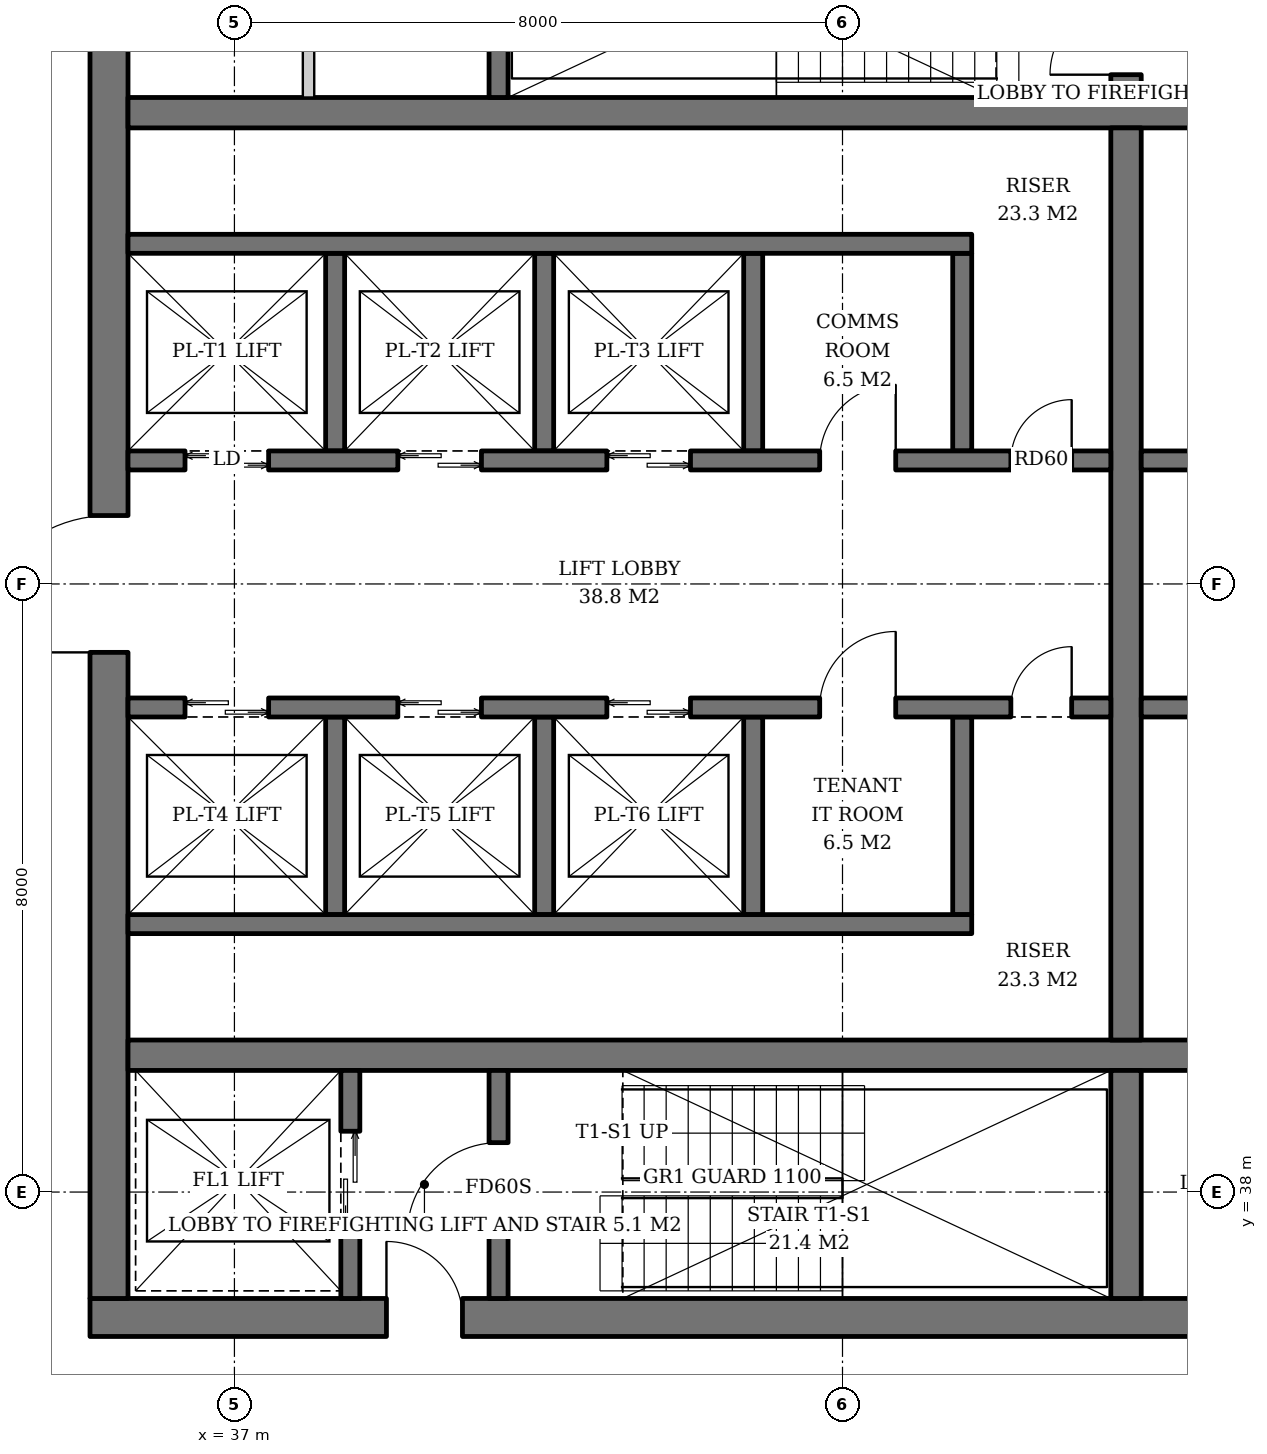
"""IFC4 building model, lengths in metres.
Left out: names, types, materials, properties, quantities, classifications, styles, units other than length and angle.
Written with IfcOpenShell. Run it as: python <this file> out.ifc"""

import sys

from ifc_helpers import new_model, si_unit, direction, frame, frame_2d, origin, place, context, subcontext, project, spatial, rectangle, extrude, element, fill, save


model = new_model("IFC4")
c1 = context("Model", 3, precision=1e-05, world=origin(), true_north=direction((0.0, 1.0)))
c2 = subcontext(c1, "Body", "Model", "MODEL_VIEW")
j1 = project(units=[si_unit("LENGTHUNIT", "METRE"), si_unit("PLANEANGLEUNIT", "RADIAN")], contexts=[c1])
p1 = place(None, origin())
s1 = spatial("IfcSite", under=j1, at=p1, CompositionType="ELEMENT")
p2 = place(p1, origin())
s2 = spatial("IfcBuilding", under=s1, at=p2, CompositionType="ELEMENT")
p3 = place(p2, frame((0.0, 0.0, 275.6)))
s3 = spatial("IfcBuildingStorey", under=s2, at=p3, CompositionType="ELEMENT", Elevation=275.6)
p4 = place(p3, frame((35.1, 36.35, 0.0), z_axis=(0.0, 0.0, 1.0), x_axis=(1.0, 0.0, 0.0)))
e1 = element("IfcWall", 1, at=p4, inside=s3, PredefinedType="SHEAR", context=c2, shape_type="SweptSolid", body=[
    extrude(rectangle(XDim=19.8, YDim=0.5, at=frame_2d((9.9, 0.0))), origin(), (0.0, 0.0, 1.0), 3.8),
])
p5 = place(p4, frame((3.9, 0.0, 0.0)))
e2 = element("IfcOpeningElement", 2, at=p5, cuts=e1, PredefinedType="OPENING", context=c2, shape_type="SweptSolid", body=[
    extrude(rectangle(XDim=1.0, YDim=2.1, at=frame_2d((0.5, 1.05))), frame((0.0, 0.26, 0.0), z_axis=(0.0, -1.0, 0.0), x_axis=(1.0, 0.0, 0.0)), (0.0, 0.0, 1.0), 0.52),
])
p6 = place(p4, frame((15.35, 0.0, 0.0)))
e3 = element("IfcOpeningElement", 3, at=p6, cuts=e1, PredefinedType="OPENING", context=c2, shape_type="SweptSolid", body=[
    extrude(rectangle(XDim=1.0, YDim=2.1, at=frame_2d((0.5, 1.05))), frame((0.0, 0.26, 0.0), z_axis=(0.0, -1.0, 0.0), x_axis=(1.0, 0.0, 0.0)), (0.0, 0.0, 1.0), 0.52),
])
p7 = place(p3, frame((35.35, 36.6, 0.0), z_axis=(0.0, 0.0, 1.0), x_axis=(0.0, 1.0, 0.0)))
e4 = element("IfcWall", 4, at=p7, inside=s3, PredefinedType="SHEAR", context=c2, shape_type="SweptSolid", body=[
    extrude(rectangle(XDim=18.8, YDim=0.5, at=frame_2d((9.4, 0.0))), origin(), (0.0, 0.0, 1.0), 3.8),
])
p8 = place(p7, frame((8.5, 0.0, 0.0)))
e5 = element("IfcOpeningElement", 5, at=p8, cuts=e4, PredefinedType="OPENING", context=c2, shape_type="SweptSolid", body=[
    extrude(rectangle(XDim=1.8, YDim=2.4, at=frame_2d((0.9, 1.2))), frame((0.0, 0.26, 0.0), z_axis=(0.0, -1.0, 0.0), x_axis=(1.0, 0.0, 0.0)), (0.0, 0.0, 1.0), 0.52),
])
for number, where, z_axis, x_axis in (
    (6, (35.6, 39.8, 0.0), (0.0, 0.0, 1.0), (1.0, 0.0, 0.0)),
    (7, (35.6, 52.2, 0.0), (0.0, 0.0, 1.0), (1.0, 0.0, 0.0)),
):
    element("IfcWall", number, at=place(p3, frame(where, z_axis=z_axis, x_axis=x_axis)), inside=s3, PredefinedType="SHEAR", context=c2, shape_type="SweptSolid", body=[
        extrude(rectangle(XDim=18.8, YDim=0.4, at=frame_2d((9.4, 0.0))), origin(), (0.0, 0.0, 1.0), 3.8),
    ])
p9 = place(p3, frame((48.73, 36.6, 0.0), z_axis=(0.0, 0.0, 1.0), x_axis=(0.0, 1.0, 0.0)))
e8 = element("IfcWall", 8, at=p9, inside=s3, PredefinedType="SHEAR", context=c2, shape_type="SweptSolid", body=[
    extrude(rectangle(XDim=3.0, YDim=0.4, at=frame_2d((1.5, 0.0))), origin(), (0.0, 0.0, 1.0), 3.8),
])
p10 = place(p3, frame((48.73, 40.0, 0.0), z_axis=(0.0, 0.0, 1.0), x_axis=(0.0, 1.0, 0.0)))
e9 = element("IfcWall", 9, at=p10, inside=s3, PredefinedType="SHEAR", context=c2, shape_type="SweptSolid", body=[
    extrude(rectangle(XDim=12.0, YDim=0.4, at=frame_2d((6.0, 0.0))), origin(), (0.0, 0.0, 1.0), 3.8),
])
p11 = place(p3, frame((48.73, 52.4, 0.0), z_axis=(0.0, 0.0, 1.0), x_axis=(0.0, 1.0, 0.0)))
e10 = element("IfcWall", 10, at=p11, inside=s3, PredefinedType="SHEAR", context=c2, shape_type="SweptSolid", body=[
    extrude(rectangle(XDim=3.0, YDim=0.4, at=frame_2d((1.5, 0.0))), origin(), (0.0, 0.0, 1.0), 3.8),
])
p12 = place(p11, frame((0.3, 0.0, 0.0)))
e11 = element("IfcOpeningElement", 11, at=p12, cuts=e10, PredefinedType="OPENING", context=c2, shape_type="SweptSolid", body=[
    extrude(rectangle(XDim=1.0, YDim=2.1, at=frame_2d((0.5, 1.05))), frame((0.0, 0.21, 0.0), z_axis=(0.0, -1.0, 0.0), x_axis=(1.0, 0.0, 0.0)), (0.0, 0.0, 1.0), 0.42),
])
p13 = place(p3, frame((38.525, 36.6, 0.0), z_axis=(0.0, 0.0, 1.0), x_axis=(0.0, 1.0, 0.0)))
e12 = element("IfcWall", 12, at=p13, inside=s3, PredefinedType="SHEAR", context=c2, shape_type="SweptSolid", body=[
    extrude(rectangle(XDim=3.0, YDim=0.25, at=frame_2d((1.5, 0.0))), origin(), (0.0, 0.0, 1.0), 3.8),
])
p14 = place(p13, frame((0.9, 0.0, 0.0)))
e13 = element("IfcOpeningElement", 13, at=p14, cuts=e12, PredefinedType="OPENING", context=c2, shape_type="SweptSolid", body=[
    extrude(rectangle(XDim=1.3, YDim=2.2, at=frame_2d((0.65, 1.1))), frame((0.0, 0.135, 0.0), z_axis=(0.0, -1.0, 0.0), x_axis=(1.0, 0.0, 0.0)), (0.0, 0.0, 1.0), 0.27),
])
p15 = place(p3, frame((40.475, 36.6, 0.0), z_axis=(0.0, 0.0, 1.0), x_axis=(0.0, 1.0, 0.0)))
e14 = element("IfcWall", 14, at=p15, inside=s3, PredefinedType="SHEAR", context=c2, shape_type="SweptSolid", body=[
    extrude(rectangle(XDim=3.0, YDim=0.25, at=frame_2d((1.5, 0.0))), origin(), (0.0, 0.0, 1.0), 3.8),
])
p16 = place(p15, frame((0.85, 0.0, 0.0)))
e15 = element("IfcOpeningElement", 15, at=p16, cuts=e14, PredefinedType="OPENING", context=c2, shape_type="SweptSolid", body=[
    extrude(rectangle(XDim=1.2, YDim=2.1, at=frame_2d((0.6, 1.05))), frame((0.0, 0.135, 0.0), z_axis=(0.0, -1.0, 0.0), x_axis=(1.0, 0.0, 0.0)), (0.0, 0.0, 1.0), 0.27),
])
p17 = place(p3, frame((40.475, 52.4, 0.0), z_axis=(0.0, 0.0, 1.0), x_axis=(0.0, 1.0, 0.0)))
e16 = element("IfcWall", 16, at=p17, inside=s3, PredefinedType="SHEAR", context=c2, shape_type="SweptSolid", body=[
    extrude(rectangle(XDim=3.0, YDim=0.25, at=frame_2d((1.5, 0.0))), origin(), (0.0, 0.0, 1.0), 3.8),
])
for number, where, z_axis, x_axis in (
    (17, (38.325, 47.75, 0.0), (0.0, 0.0, 1.0), (0.0, 1.0, 0.0)),
    (18, (41.075, 47.75, 0.0), (0.0, 0.0, 1.0), (0.0, 1.0, 0.0)),
    (19, (43.825, 47.75, 0.0), (0.0, 0.0, 1.0), (0.0, 1.0, 0.0)),
    (20, (46.575, 47.75, 0.0), (0.0, 0.0, 1.0), (0.0, 1.0, 0.0)),
):
    element("IfcWall", number, at=place(p3, frame(where, z_axis=z_axis, x_axis=x_axis)), inside=s3, PredefinedType="SHEAR", context=c2, shape_type="SweptSolid", body=[
        extrude(rectangle(XDim=2.6, YDim=0.25, at=frame_2d((1.3, 0.0))), origin(), (0.0, 0.0, 1.0), 3.8),
    ])
p18 = place(p3, frame((35.6, 50.475, 0.0), z_axis=(0.0, 0.0, 1.0), x_axis=(1.0, 0.0, 0.0)))
e21 = element("IfcWall", 21, at=p18, inside=s3, PredefinedType="SHEAR", context=c2, shape_type="SweptSolid", body=[
    extrude(rectangle(XDim=11.1, YDim=0.25, at=frame_2d((5.55, 0.0))), origin(), (0.0, 0.0, 1.0), 3.8),
])
p19 = place(p3, frame((35.6, 47.625, 0.0), z_axis=(0.0, 0.0, 1.0), x_axis=(1.0, 0.0, 0.0)))
e22 = element("IfcWall", 22, at=p19, inside=s3, PredefinedType="SHEAR", context=c2, shape_type="SweptSolid", body=[
    extrude(rectangle(XDim=12.93, YDim=0.25, at=frame_2d((6.465, 0.0))), origin(), (0.0, 0.0, 1.0), 3.8),
])
p20 = place(p19, frame((0.75, 0.0, 0.0)))
e23 = element("IfcOpeningElement", 23, at=p20, cuts=e22, PredefinedType="OPENING", context=c2, shape_type="SweptSolid", body=[
    extrude(rectangle(XDim=1.1, YDim=2.2, at=frame_2d((0.55, 1.1))), frame((0.0, 0.135, 0.0), z_axis=(0.0, -1.0, 0.0), x_axis=(1.0, 0.0, 0.0)), (0.0, 0.0, 1.0), 0.27),
])
p21 = place(p19, frame((3.55, 0.0, 0.0)))
e24 = element("IfcOpeningElement", 24, at=p21, cuts=e22, PredefinedType="OPENING", context=c2, shape_type="SweptSolid", body=[
    extrude(rectangle(XDim=1.1, YDim=2.2, at=frame_2d((0.55, 1.1))), frame((0.0, 0.135, 0.0), z_axis=(0.0, -1.0, 0.0), x_axis=(1.0, 0.0, 0.0)), (0.0, 0.0, 1.0), 0.27),
])
p22 = place(p19, frame((6.3, 0.0, 0.0)))
e25 = element("IfcOpeningElement", 25, at=p22, cuts=e22, PredefinedType="OPENING", context=c2, shape_type="SweptSolid", body=[
    extrude(rectangle(XDim=1.1, YDim=2.2, at=frame_2d((0.55, 1.1))), frame((0.0, 0.135, 0.0), z_axis=(0.0, -1.0, 0.0), x_axis=(1.0, 0.0, 0.0)), (0.0, 0.0, 1.0), 0.27),
])
p23 = place(p19, frame((9.1, 0.0, 0.0)))
e26 = element("IfcOpeningElement", 26, at=p23, cuts=e22, PredefinedType="OPENING", context=c2, shape_type="SweptSolid", body=[
    extrude(rectangle(XDim=1.0, YDim=2.1, at=frame_2d((0.5, 1.05))), frame((0.0, 0.135, 0.0), z_axis=(0.0, -1.0, 0.0), x_axis=(1.0, 0.0, 0.0)), (0.0, 0.0, 1.0), 0.27),
])
p24 = place(p19, frame((11.615, 0.0, 0.0)))
e27 = element("IfcOpeningElement", 27, at=p24, cuts=e22, PredefinedType="OPENING", context=c2, shape_type="SweptSolid", body=[
    extrude(rectangle(XDim=0.8, YDim=2.0, at=frame_2d((0.4, 1.0))), frame((0.0, 0.135, 0.0), z_axis=(0.0, -1.0, 0.0), x_axis=(1.0, 0.0, 0.0)), (0.0, 0.0, 1.0), 0.27),
])
for number, where, z_axis, x_axis in (
    (28, (38.325, 44.25, 0.0), (0.0, 0.0, 1.0), (0.0, -1.0, 0.0)),
    (29, (41.075, 44.25, 0.0), (0.0, 0.0, 1.0), (0.0, -1.0, 0.0)),
    (30, (43.825, 44.25, 0.0), (0.0, 0.0, 1.0), (0.0, -1.0, 0.0)),
    (31, (46.575, 44.25, 0.0), (0.0, 0.0, 1.0), (0.0, -1.0, 0.0)),
):
    element("IfcWall", number, at=place(p3, frame(where, z_axis=z_axis, x_axis=x_axis)), inside=s3, PredefinedType="SHEAR", context=c2, shape_type="SweptSolid", body=[
        extrude(rectangle(XDim=2.6, YDim=0.25, at=frame_2d((1.3, 0.0))), origin(), (0.0, 0.0, 1.0), 3.8),
    ])
p25 = place(p3, frame((35.6, 41.525, 0.0), z_axis=(0.0, 0.0, 1.0), x_axis=(1.0, 0.0, 0.0)))
e32 = element("IfcWall", 32, at=p25, inside=s3, PredefinedType="SHEAR", context=c2, shape_type="SweptSolid", body=[
    extrude(rectangle(XDim=11.1, YDim=0.25, at=frame_2d((5.55, 0.0))), origin(), (0.0, 0.0, 1.0), 3.8),
])
p26 = place(p3, frame((35.6, 44.375, 0.0), z_axis=(0.0, 0.0, 1.0), x_axis=(1.0, 0.0, 0.0)))
e33 = element("IfcWall", 33, at=p26, inside=s3, PredefinedType="SHEAR", context=c2, shape_type="SweptSolid", body=[
    extrude(rectangle(XDim=12.93, YDim=0.25, at=frame_2d((6.465, 0.0))), origin(), (0.0, 0.0, 1.0), 3.8),
])
p27 = place(p26, frame((0.75, 0.0, 0.0)))
e34 = element("IfcOpeningElement", 34, at=p27, cuts=e33, PredefinedType="OPENING", context=c2, shape_type="SweptSolid", body=[
    extrude(rectangle(XDim=1.1, YDim=2.2, at=frame_2d((0.55, 1.1))), frame((0.0, 0.135, 0.0), z_axis=(0.0, -1.0, 0.0), x_axis=(1.0, 0.0, 0.0)), (0.0, 0.0, 1.0), 0.27),
])
p28 = place(p26, frame((3.55, 0.0, 0.0)))
e35 = element("IfcOpeningElement", 35, at=p28, cuts=e33, PredefinedType="OPENING", context=c2, shape_type="SweptSolid", body=[
    extrude(rectangle(XDim=1.1, YDim=2.2, at=frame_2d((0.55, 1.1))), frame((0.0, 0.135, 0.0), z_axis=(0.0, -1.0, 0.0), x_axis=(1.0, 0.0, 0.0)), (0.0, 0.0, 1.0), 0.27),
])
p29 = place(p26, frame((6.3, 0.0, 0.0)))
e36 = element("IfcOpeningElement", 36, at=p29, cuts=e33, PredefinedType="OPENING", context=c2, shape_type="SweptSolid", body=[
    extrude(rectangle(XDim=1.1, YDim=2.2, at=frame_2d((0.55, 1.1))), frame((0.0, 0.135, 0.0), z_axis=(0.0, -1.0, 0.0), x_axis=(1.0, 0.0, 0.0)), (0.0, 0.0, 1.0), 0.27),
])
p30 = place(p26, frame((9.1, 0.0, 0.0)))
e37 = element("IfcOpeningElement", 37, at=p30, cuts=e33, PredefinedType="OPENING", context=c2, shape_type="SweptSolid", body=[
    extrude(rectangle(XDim=1.0, YDim=2.1, at=frame_2d((0.5, 1.05))), frame((0.0, 0.135, 0.0), z_axis=(0.0, -1.0, 0.0), x_axis=(1.0, 0.0, 0.0)), (0.0, 0.0, 1.0), 0.27),
])
p31 = place(p26, frame((11.615, 0.0, 0.0)))
e38 = element("IfcOpeningElement", 38, at=p31, cuts=e33, PredefinedType="OPENING", context=c2, shape_type="SweptSolid", body=[
    extrude(rectangle(XDim=0.8, YDim=2.0, at=frame_2d((0.4, 1.0))), frame((0.0, 0.135, 0.0), z_axis=(0.0, -1.0, 0.0), x_axis=(1.0, 0.0, 0.0)), (0.0, 0.0, 1.0), 0.27),
])
p32 = place(p3, frame((48.93, 47.625, 0.0), z_axis=(0.0, 0.0, 1.0), x_axis=(1.0, 0.0, 0.0)))
e39 = element("IfcWall", 39, at=p32, inside=s3, PredefinedType="SHEAR", context=c2, shape_type="SweptSolid", body=[
    extrude(rectangle(XDim=5.47, YDim=0.25, at=frame_2d((2.735, 0.0))), origin(), (0.0, 0.0, 1.0), 3.8),
])
p33 = place(p32, frame((0.78, 0.0, 0.0)))
e40 = element("IfcOpeningElement", 40, at=p33, cuts=e39, PredefinedType="OPENING", context=c2, shape_type="SweptSolid", body=[
    extrude(rectangle(XDim=1.0, YDim=2.1, at=frame_2d((0.5, 1.05))), frame((0.0, 0.135, 0.0), z_axis=(0.0, -1.0, 0.0), x_axis=(1.0, 0.0, 0.0)), (0.0, 0.0, 1.0), 0.27),
])
p34 = place(p32, frame((3.64, 0.0, 0.0)))
e41 = element("IfcOpeningElement", 41, at=p34, cuts=e39, PredefinedType="OPENING", context=c2, shape_type="SweptSolid", body=[
    extrude(rectangle(XDim=1.0, YDim=2.1, at=frame_2d((0.5, 1.05))), frame((0.0, 0.135, 0.0), z_axis=(0.0, -1.0, 0.0), x_axis=(1.0, 0.0, 0.0)), (0.0, 0.0, 1.0), 0.27),
])
p35 = place(p3, frame((48.93, 44.375, 0.0), z_axis=(0.0, 0.0, 1.0), x_axis=(1.0, 0.0, 0.0)))
e42 = element("IfcWall", 42, at=p35, inside=s3, PredefinedType="SHEAR", context=c2, shape_type="SweptSolid", body=[
    extrude(rectangle(XDim=5.47, YDim=0.25, at=frame_2d((2.735, 0.0))), origin(), (0.0, 0.0, 1.0), 3.8),
])
p36 = place(p35, frame((0.78, 0.0, 0.0)))
e43 = element("IfcOpeningElement", 43, at=p36, cuts=e42, PredefinedType="OPENING", context=c2, shape_type="SweptSolid", body=[
    extrude(rectangle(XDim=1.0, YDim=2.1, at=frame_2d((0.5, 1.05))), frame((0.0, 0.135, 0.0), z_axis=(0.0, -1.0, 0.0), x_axis=(1.0, 0.0, 0.0)), (0.0, 0.0, 1.0), 0.27),
])
p37 = place(p35, frame((3.64, 0.0, 0.0)))
e44 = element("IfcOpeningElement", 44, at=p37, cuts=e42, PredefinedType="OPENING", context=c2, shape_type="SweptSolid", body=[
    extrude(rectangle(XDim=1.0, YDim=2.1, at=frame_2d((0.5, 1.05))), frame((0.0, 0.135, 0.0), z_axis=(0.0, -1.0, 0.0), x_axis=(1.0, 0.0, 0.0)), (0.0, 0.0, 1.0), 0.27),
])
p38 = place(p3, frame((37.975, 52.4, 0.0), z_axis=(0.0, 0.0, 1.0), x_axis=(0.0, 1.0, 0.0)))
e45 = element("IfcWall", 45, at=p38, inside=s3, PredefinedType="SOLIDWALL", context=c2, shape_type="SweptSolid", body=[
    extrude(rectangle(XDim=3.0, YDim=0.15, at=frame_2d((1.5, 0.0))), origin(), (0.0, 0.0, 1.0), 3.62),
])
p39 = place(p14, origin())
e46 = element("IfcDoor", 46, at=p39, inside=s3, OperationType="DOUBLE_DOOR_SLIDING", PredefinedType="DOOR", context=c2, shape_type="SweptSolid", body=[
    extrude(rectangle(XDim=1.3, YDim=2.2, at=frame_2d((0.65, 1.1))), frame((0.0, 0.025, 0.0), z_axis=(0.0, -1.0, 0.0), x_axis=(1.0, 0.0, 0.0)), (0.0, 0.0, 1.0), 0.05),
])
fill(e13, e46)
p40 = place(p16, origin())
e47 = element("IfcDoor", 47, at=p40, inside=s3, OperationType="SINGLE_SWING_LEFT", PredefinedType="DOOR", context=c2, shape_type="SweptSolid", body=[
    extrude(rectangle(XDim=1.2, YDim=2.1, at=frame_2d((0.6, 1.05))), frame((0.0, 0.025, 0.0), z_axis=(0.0, -1.0, 0.0), x_axis=(1.0, 0.0, 0.0)), (0.0, 0.0, 1.0), 0.05),
])
fill(e15, e47)
p41 = place(p20, origin())
e48 = element("IfcDoor", 48, at=p41, inside=s3, OperationType="DOUBLE_DOOR_SLIDING", PredefinedType="DOOR", context=c2, shape_type="SweptSolid", body=[
    extrude(rectangle(XDim=1.1, YDim=2.2, at=frame_2d((0.55, 1.1))), frame((0.0, 0.025, 0.0), z_axis=(0.0, -1.0, 0.0), x_axis=(1.0, 0.0, 0.0)), (0.0, 0.0, 1.0), 0.05),
])
fill(e23, e48)
p42 = place(p21, origin())
e49 = element("IfcDoor", 49, at=p42, inside=s3, OperationType="DOUBLE_DOOR_SLIDING", PredefinedType="DOOR", context=c2, shape_type="SweptSolid", body=[
    extrude(rectangle(XDim=1.1, YDim=2.2, at=frame_2d((0.55, 1.1))), frame((0.0, 0.025, 0.0), z_axis=(0.0, -1.0, 0.0), x_axis=(1.0, 0.0, 0.0)), (0.0, 0.0, 1.0), 0.05),
])
fill(e24, e49)
p43 = place(p22, origin())
e50 = element("IfcDoor", 50, at=p43, inside=s3, OperationType="DOUBLE_DOOR_SLIDING", PredefinedType="DOOR", context=c2, shape_type="SweptSolid", body=[
    extrude(rectangle(XDim=1.1, YDim=2.2, at=frame_2d((0.55, 1.1))), frame((0.0, 0.025, 0.0), z_axis=(0.0, -1.0, 0.0), x_axis=(1.0, 0.0, 0.0)), (0.0, 0.0, 1.0), 0.05),
])
fill(e25, e50)
p44 = place(p23, origin())
e51 = element("IfcDoor", 51, at=p44, inside=s3, OperationType="SINGLE_SWING_RIGHT", PredefinedType="DOOR", context=c2, shape_type="SweptSolid", body=[
    extrude(rectangle(XDim=1.0, YDim=2.1, at=frame_2d((0.5, 1.05))), frame((0.0, 0.025, 0.0), z_axis=(0.0, -1.0, 0.0), x_axis=(1.0, 0.0, 0.0)), (0.0, 0.0, 1.0), 0.05),
])
fill(e26, e51)
p45 = place(p24, origin())
e52 = element("IfcDoor", 52, at=p45, inside=s3, OperationType="SINGLE_SWING_RIGHT", PredefinedType="DOOR", context=c2, shape_type="SweptSolid", body=[
    extrude(rectangle(XDim=0.8, YDim=2.0, at=frame_2d((0.4, 1.0))), frame((0.0, 0.025, 0.0), z_axis=(0.0, -1.0, 0.0), x_axis=(1.0, 0.0, 0.0)), (0.0, 0.0, 1.0), 0.05),
])
fill(e27, e52)
p46 = place(p27, origin())
e53 = element("IfcDoor", 53, at=p46, inside=s3, OperationType="DOUBLE_DOOR_SLIDING", PredefinedType="DOOR", context=c2, shape_type="SweptSolid", body=[
    extrude(rectangle(XDim=1.1, YDim=2.2, at=frame_2d((0.55, 1.1))), frame((0.0, 0.025, 0.0), z_axis=(0.0, -1.0, 0.0), x_axis=(1.0, 0.0, 0.0)), (0.0, 0.0, 1.0), 0.05),
])
fill(e34, e53)
p47 = place(p28, origin())
e54 = element("IfcDoor", 54, at=p47, inside=s3, OperationType="DOUBLE_DOOR_SLIDING", PredefinedType="DOOR", context=c2, shape_type="SweptSolid", body=[
    extrude(rectangle(XDim=1.1, YDim=2.2, at=frame_2d((0.55, 1.1))), frame((0.0, 0.025, 0.0), z_axis=(0.0, -1.0, 0.0), x_axis=(1.0, 0.0, 0.0)), (0.0, 0.0, 1.0), 0.05),
])
fill(e35, e54)
p48 = place(p29, origin())
e55 = element("IfcDoor", 55, at=p48, inside=s3, OperationType="DOUBLE_DOOR_SLIDING", PredefinedType="DOOR", context=c2, shape_type="SweptSolid", body=[
    extrude(rectangle(XDim=1.1, YDim=2.2, at=frame_2d((0.55, 1.1))), frame((0.0, 0.025, 0.0), z_axis=(0.0, -1.0, 0.0), x_axis=(1.0, 0.0, 0.0)), (0.0, 0.0, 1.0), 0.05),
])
fill(e36, e55)
p49 = place(p30, origin())
e56 = element("IfcDoor", 56, at=p49, inside=s3, OperationType="SINGLE_SWING_RIGHT", PredefinedType="DOOR", context=c2, shape_type="SweptSolid", body=[
    extrude(rectangle(XDim=1.0, YDim=2.1, at=frame_2d((0.5, 1.05))), frame((0.0, 0.025, 0.0), z_axis=(0.0, -1.0, 0.0), x_axis=(1.0, 0.0, 0.0)), (0.0, 0.0, 1.0), 0.05),
])
fill(e37, e56)
p50 = place(p31, origin())
e57 = element("IfcDoor", 57, at=p50, inside=s3, OperationType="SINGLE_SWING_RIGHT", PredefinedType="DOOR", context=c2, shape_type="SweptSolid", body=[
    extrude(rectangle(XDim=0.8, YDim=2.0, at=frame_2d((0.4, 1.0))), frame((0.0, 0.025, 0.0), z_axis=(0.0, -1.0, 0.0), x_axis=(1.0, 0.0, 0.0)), (0.0, 0.0, 1.0), 0.05),
])
fill(e38, e57)
p51 = place(p12, origin())
e58 = element("IfcDoor", 58, at=p51, inside=s3, OperationType="SINGLE_SWING_LEFT", PredefinedType="DOOR", context=c2, shape_type="SweptSolid", body=[
    extrude(rectangle(XDim=1.0, YDim=2.1, at=frame_2d((0.5, 1.05))), frame((0.0, 0.025, 0.0), z_axis=(0.0, -1.0, 0.0), x_axis=(1.0, 0.0, 0.0)), (0.0, 0.0, 1.0), 0.05),
])
fill(e11, e58)
p52 = place(p5, origin())
e59 = element("IfcDoor", 59, at=p52, inside=s3, OperationType="SINGLE_SWING_LEFT", PredefinedType="DOOR", context=c2, shape_type="SweptSolid", body=[
    extrude(rectangle(XDim=1.0, YDim=2.1, at=frame_2d((0.5, 1.05))), frame((0.0, 0.025, 0.0), z_axis=(0.0, -1.0, 0.0), x_axis=(1.0, 0.0, 0.0)), (0.0, 0.0, 1.0), 0.05),
])
fill(e2, e59)
p53 = place(p8, origin())
e60 = element("IfcDoor", 60, at=p53, inside=s3, OperationType="DOUBLE_DOOR_SINGLE_SWING", PredefinedType="DOOR", context=c2, shape_type="SweptSolid", body=[
    extrude(rectangle(XDim=1.8, YDim=2.4, at=frame_2d((0.9, 1.2))), frame((0.0, 0.025, 0.0), z_axis=(0.0, -1.0, 0.0), x_axis=(1.0, 0.0, 0.0)), (0.0, 0.0, 1.0), 0.05),
])
fill(e5, e60)
save(model, sys.argv[1])
